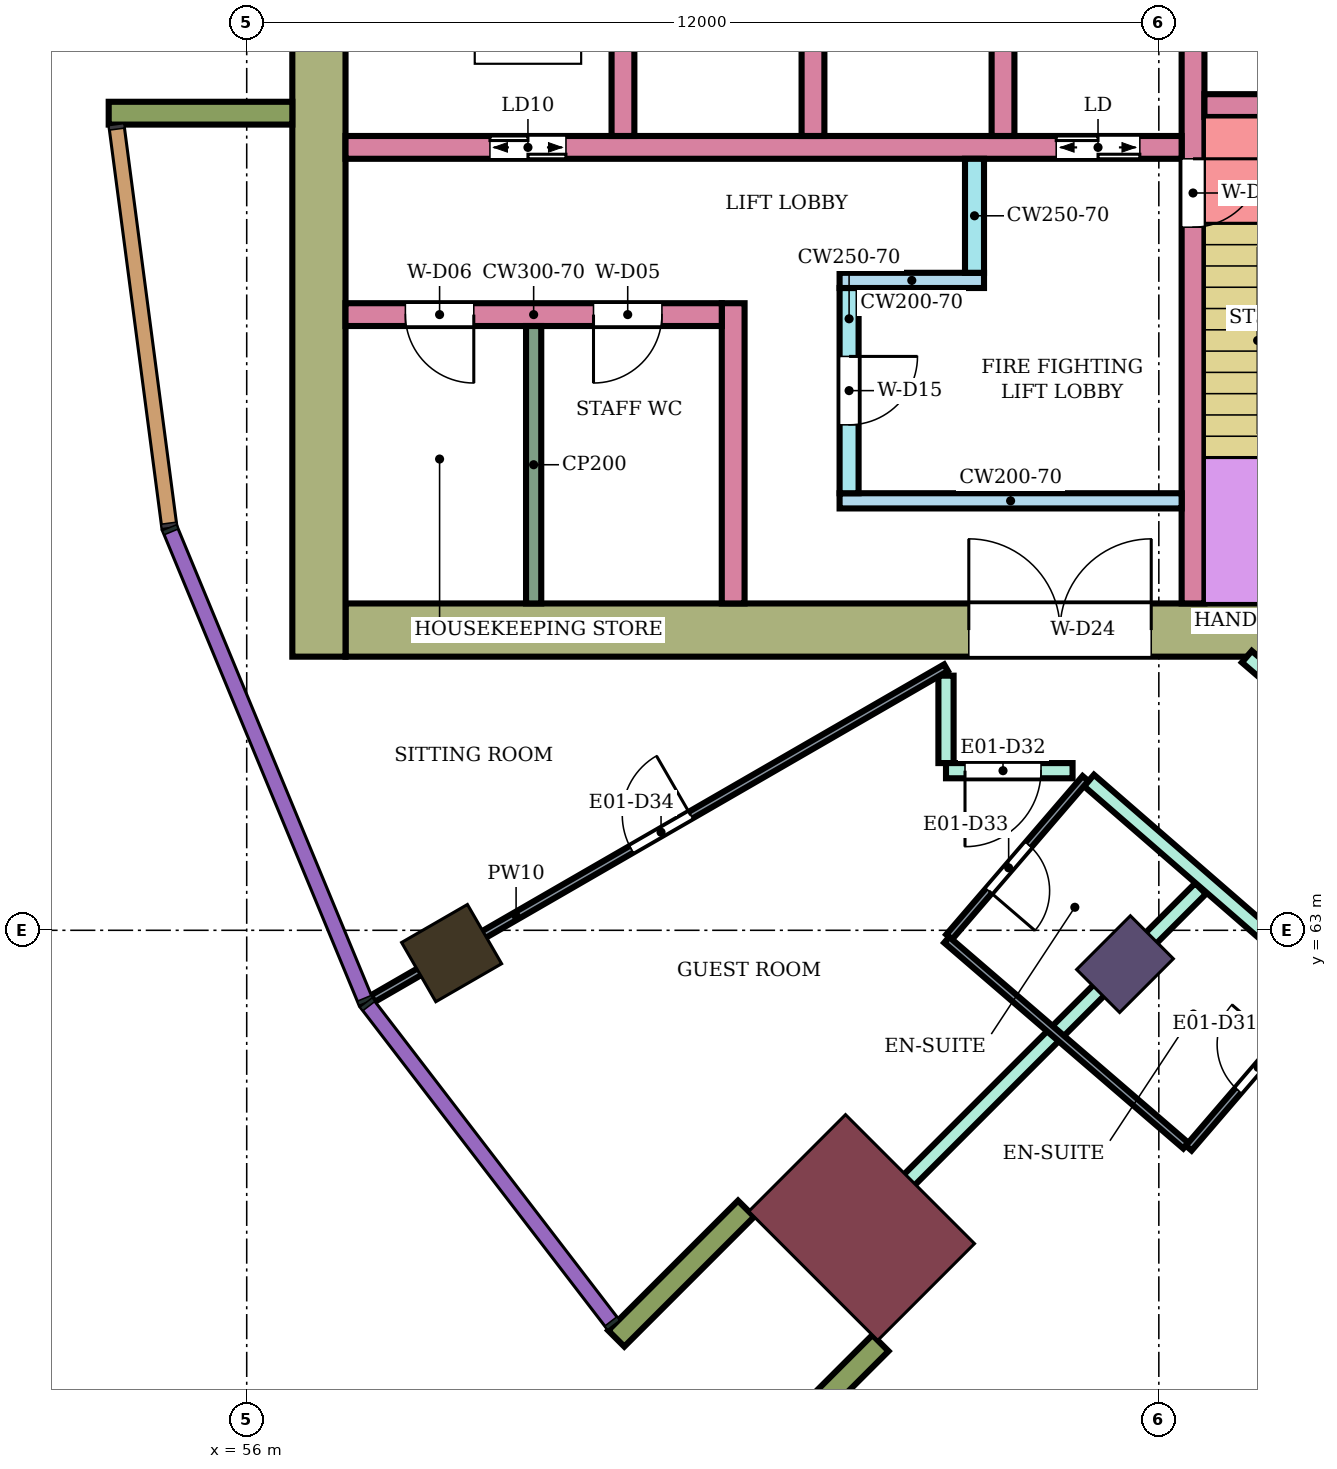
"""IFC4 building model, lengths in metres.
Left out: names, types, materials, properties, quantities, classifications, styles, units other than length and angle.
Written with IfcOpenShell. Run it as: python <this file> out.ifc"""

import sys

from ifc_helpers import new_model, si_unit, direction, frame, frame_2d, origin, origin_2d, place, context, subcontext, project, spatial, rectangle, extrude, element, fill, save


model = new_model("IFC4")
c1 = context("Model", 3, precision=1e-05, world=origin(), true_north=direction((0.0, 1.0)))
c2 = subcontext(c1, "Body", "Model", "MODEL_VIEW")
j1 = project(units=[si_unit("LENGTHUNIT", "METRE"), si_unit("PLANEANGLEUNIT", "RADIAN")], contexts=[c1])
p1 = place(None, origin())
s1 = spatial("IfcSite", under=j1, at=p1, CompositionType="ELEMENT")
p2 = place(p1, origin())
s2 = spatial("IfcBuilding", under=s1, at=p2, CompositionType="ELEMENT")
p3 = place(p2, frame((0.0, 0.0, 114.6)))
s3 = spatial("IfcBuildingStorey", under=s2, at=p3, CompositionType="ELEMENT", Elevation=114.6)
p4 = place(p3, frame((58.696, 62.7, 0.0), z_axis=(0.0, 0.0, 1.0), x_axis=(-0.866025403784, -0.5, 0.0)))
e1 = element("IfcColumn", 1, at=p4, inside=s3, PredefinedType="COLUMN", context=c2, shape_type="SweptSolid", body=[
    extrude(rectangle(XDim=1.0, YDim=0.9, at=origin_2d()), origin(), (0.0, 0.0, 1.0), 3.9),
])
p5 = place(p3, frame((67.555, 62.555, 0.0), z_axis=(0.0, 0.0, 1.0), x_axis=(-0.707106781187, -0.707106781187, 0.0)))
e2 = element("IfcColumn", 2, at=p5, inside=s3, PredefinedType="COLUMN", context=c2, shape_type="SweptSolid", body=[
    extrude(rectangle(XDim=1.0, YDim=0.8, at=origin_2d()), origin(), (0.0, 0.0, 1.0), 3.9),
])
p6 = place(p3, frame((64.09, 59.09, 0.0), z_axis=(0.0, 0.0, 1.0), x_axis=(-0.707106781187, -0.707106781187, 0.0)))
e3 = element("IfcColumn", 3, at=p6, inside=s3, PredefinedType="COLUMN", context=c2, shape_type="SweptSolid", body=[
    extrude(rectangle(XDim=1.8, YDim=2.4, at=origin_2d()), origin(), (0.0, 0.0, 1.0), 3.9),
])
p7 = place(p3, frame((72.1, 66.95, 0.0), z_axis=(0.0, 0.0, 1.0), x_axis=(-1.0, 0.0, 0.0)))
e4 = element("IfcWall", 4, at=p7, inside=s3, PredefinedType="SHEAR", context=c2, shape_type="SweptSolid", body=[
    extrude(rectangle(XDim=14.8, YDim=0.7, at=frame_2d((7.4, 0.0))), origin(), (0.0, 0.0, 1.0), 3.58),
])
p8 = place(p7, frame((4.2, 0.0, 0.0)))
e5 = element("IfcOpeningElement", 5, at=p8, cuts=e4, PredefinedType="OPENING", context=c2, shape_type="SweptSolid", body=[
    extrude(rectangle(XDim=2.4, YDim=2.4, at=frame_2d((1.2, 1.2))), frame((0.0, 0.36, 0.0), z_axis=(0.0, -1.0, 0.0), x_axis=(1.0, 0.0, 0.0)), (0.0, 0.0, 1.0), 0.72),
])
p9 = place(p3, frame((56.95, 83.4, 0.0), z_axis=(0.0, 0.0, 1.0), x_axis=(0.0, -1.0, 0.0)))
e6 = element("IfcWall", 6, at=p9, inside=s3, PredefinedType="SHEAR", context=c2, shape_type="SweptSolid", body=[
    extrude(rectangle(XDim=16.8, YDim=0.7, at=frame_2d((8.4, 0.0))), origin(), (0.0, 0.0, 1.0), 3.58),
])
p10 = place(p3, frame((68.45, 75.0, 0.0), z_axis=(0.0, 0.0, 1.0), x_axis=(0.0, -1.0, 0.0)))
e7 = element("IfcWall", 7, at=p10, inside=s3, PredefinedType="SHEAR", context=c2, shape_type="SweptSolid", body=[
    extrude(rectangle(XDim=7.7, YDim=0.3, at=frame_2d((3.85, 0.0))), origin(), (0.0, 0.0, 1.0), 3.58),
])
p11 = place(p10, frame((1.85, 0.0, 0.0)))
e8 = element("IfcOpeningElement", 8, at=p11, cuts=e7, PredefinedType="OPENING", context=c2, shape_type="SweptSolid", body=[
    extrude(rectangle(XDim=0.9, YDim=2.1, at=frame_2d((0.45, 1.05))), frame((0.0, 0.16, 0.0), z_axis=(0.0, -1.0, 0.0), x_axis=(1.0, 0.0, 0.0)), (0.0, 0.0, 1.0), 0.32),
])
p12 = place(p3, frame((71.65, 73.85, 0.0), z_axis=(0.0, 0.0, 1.0), x_axis=(-1.0, 0.0, 0.0)))
e9 = element("IfcWall", 9, at=p12, inside=s3, PredefinedType="SHEAR", context=c2, shape_type="SweptSolid", body=[
    extrude(rectangle(XDim=3.05, YDim=0.3, at=frame_2d((1.525, 0.0))), origin(), (0.0, 0.0, 1.0), 3.58),
])
p13 = place(p12, frame((1.1, 0.0, 0.0)))
e10 = element("IfcOpeningElement", 10, at=p13, cuts=e9, PredefinedType="OPENING", context=c2, shape_type="SweptSolid", body=[
    extrude(rectangle(XDim=0.7, YDim=2.0, at=frame_2d((0.35, 1.0))), frame((0.0, 0.16, 0.0), z_axis=(0.0, -1.0, 0.0), x_axis=(1.0, 0.0, 0.0)), (0.0, 0.0, 1.0), 0.32),
])
p14 = place(p3, frame((68.3, 73.3, 0.0), z_axis=(0.0, 0.0, 1.0), x_axis=(-1.0, 0.0, 0.0)))
e11 = element("IfcWall", 11, at=p14, inside=s3, PredefinedType="SHEAR", context=c2, shape_type="SweptSolid", body=[
    extrude(rectangle(XDim=11.0, YDim=0.3, at=frame_2d((5.5, 0.0))), origin(), (0.0, 0.0, 1.0), 3.58),
])
p15 = place(p14, frame((0.55, 0.0, 0.0)))
e12 = element("IfcOpeningElement", 12, at=p15, cuts=e11, PredefinedType="OPENING", context=c2, shape_type="SweptSolid", body=[
    extrude(rectangle(XDim=1.1, YDim=2.1, at=frame_2d((0.55, 1.05))), frame((0.0, 0.16, 0.0), z_axis=(0.0, -1.0, 0.0), x_axis=(1.0, 0.0, 0.0)), (0.0, 0.0, 1.0), 0.32),
])
p16 = place(p14, frame((8.1, 0.0, 0.0)))
e13 = element("IfcOpeningElement", 13, at=p16, cuts=e11, PredefinedType="OPENING", context=c2, shape_type="SweptSolid", body=[
    extrude(rectangle(XDim=1.0, YDim=2.1, at=frame_2d((0.5, 1.05))), frame((0.0, 0.16, 0.0), z_axis=(0.0, -1.0, 0.0), x_axis=(1.0, 0.0, 0.0)), (0.0, 0.0, 1.0), 0.32),
])
for number, where, z_axis, x_axis in (
    (14, (65.95, 76.0, 0.0), (0.0, 0.0, 1.0), (0.0, -1.0, 0.0)),
    (15, (63.45, 76.0, 0.0), (0.0, 0.0, 1.0), (0.0, -1.0, 0.0)),
    (16, (60.95, 76.0, 0.0), (0.0, 0.0, 1.0), (0.0, -1.0, 0.0)),
):
    element("IfcWall", number, at=place(p3, frame(where, z_axis=z_axis, x_axis=x_axis)), inside=s3, PredefinedType="SHEAR", context=c2, shape_type="SweptSolid", body=[
        extrude(rectangle(XDim=2.55, YDim=0.3, at=frame_2d((1.275, 0.0))), origin(), (0.0, 0.0, 1.0), 3.58),
    ])
p17 = place(p3, frame((68.3, 68.65, 0.0), z_axis=(0.0, 0.0, 1.0), x_axis=(-1.0, 0.0, 0.0)))
e17 = element("IfcWall", 17, at=p17, inside=s3, PredefinedType="SHEAR", context=c2, shape_type="SweptSolid", body=[
    extrude(rectangle(XDim=4.5, YDim=0.2, at=frame_2d((2.25, 0.0))), origin(), (0.0, 0.0, 1.0), 3.58),
])
p18 = place(p3, frame((63.925, 71.45, 0.0), z_axis=(0.0, 0.0, 1.0), x_axis=(0.0, -1.0, 0.0)))
e18 = element("IfcWall", 18, at=p18, inside=s3, PredefinedType="SHEAR", context=c2, shape_type="SweptSolid", body=[
    extrude(rectangle(XDim=2.7, YDim=0.25, at=frame_2d((1.35, 0.0))), origin(), (0.0, 0.0, 1.0), 3.58),
])
p19 = place(p18, frame((0.9, 0.0, 0.0)))
e19 = element("IfcOpeningElement", 19, at=p19, cuts=e18, PredefinedType="OPENING", context=c2, shape_type="SweptSolid", body=[
    extrude(rectangle(XDim=0.9, YDim=2.1, at=frame_2d((0.45, 1.05))), frame((0.0, 0.135, 0.0), z_axis=(0.0, -1.0, 0.0), x_axis=(1.0, 0.0, 0.0)), (0.0, 0.0, 1.0), 0.27),
])
p20 = place(p3, frame((65.7, 71.55, 0.0), z_axis=(0.0, 0.0, 1.0), x_axis=(-1.0, 0.0, 0.0)))
e20 = element("IfcWall", 20, at=p20, inside=s3, PredefinedType="SHEAR", context=c2, shape_type="SweptSolid", body=[
    extrude(rectangle(XDim=1.9, YDim=0.2, at=frame_2d((0.95, 0.0))), origin(), (0.0, 0.0, 1.0), 3.58),
])
p21 = place(p3, frame((65.575, 73.15, 0.0), z_axis=(0.0, 0.0, 1.0), x_axis=(0.0, -1.0, 0.0)))
e21 = element("IfcWall", 21, at=p21, inside=s3, PredefinedType="SHEAR", context=c2, shape_type="SweptSolid", body=[
    extrude(rectangle(XDim=1.5, YDim=0.25, at=frame_2d((0.75, 0.0))), origin(), (0.0, 0.0, 1.0), 3.58),
])
p22 = place(p3, frame((62.4, 71.25, 0.0), z_axis=(0.0, 0.0, 1.0), x_axis=(0.0, -1.0, 0.0)))
e22 = element("IfcWall", 22, at=p22, inside=s3, PredefinedType="SHEAR", context=c2, shape_type="SweptSolid", body=[
    extrude(rectangle(XDim=3.95, YDim=0.3, at=frame_2d((1.975, 0.0))), origin(), (0.0, 0.0, 1.0), 3.58),
])
p23 = place(p3, frame((62.25, 71.1, 0.0), z_axis=(0.0, 0.0, 1.0), x_axis=(-1.0, 0.0, 0.0)))
e23 = element("IfcWall", 23, at=p23, inside=s3, PredefinedType="SHEAR", context=c2, shape_type="SweptSolid", body=[
    extrude(rectangle(XDim=4.95, YDim=0.3, at=frame_2d((2.475, 0.0))), origin(), (0.0, 0.0, 1.0), 3.58),
])
p24 = place(p23, frame((0.788, 0.0, 0.0)))
e24 = element("IfcOpeningElement", 24, at=p24, cuts=e23, PredefinedType="OPENING", context=c2, shape_type="SweptSolid", body=[
    extrude(rectangle(XDim=0.9, YDim=2.1, at=frame_2d((0.45, 1.05))), frame((0.0, 0.16, 0.0), z_axis=(0.0, -1.0, 0.0), x_axis=(1.0, 0.0, 0.0)), (0.0, 0.0, 1.0), 0.32),
])
p25 = place(p23, frame((3.262, 0.0, 0.0)))
e25 = element("IfcOpeningElement", 25, at=p25, cuts=e23, PredefinedType="OPENING", context=c2, shape_type="SweptSolid", body=[
    extrude(rectangle(XDim=0.9, YDim=2.1, at=frame_2d((0.45, 1.05))), frame((0.0, 0.16, 0.0), z_axis=(0.0, -1.0, 0.0), x_axis=(1.0, 0.0, 0.0)), (0.0, 0.0, 1.0), 0.32),
])
for number, where, z_axis, x_axis in (
    (26, (56.6, 73.75, 0.0), (0.0, 0.0, 1.0), (-1.0, 0.0, 0.0)),
    (27, (62.57, 59.338, 0.0), (0.0, 0.0, 1.0), (-0.707, -0.707, 0.0)),
    (28, (64.338, 57.57, 0.0), (0.0, 0.0, 1.0), (-0.707, -0.707, 0.0)),
):
    element("IfcWall", number, at=place(p3, frame(where, z_axis=z_axis, x_axis=x_axis)), inside=s3, PredefinedType="NOTDEFINED", context=c2, shape_type="SweptSolid", body=[
        extrude(rectangle(XDim=2.416, YDim=0.3, at=frame_2d((1.208, 0.0))), origin(), (0.0, 0.0, 1.0), 3.9),
    ])
p26 = place(p3, frame((63.596, 58.596, 0.0), z_axis=(0.0, 0.0, 1.0), x_axis=(0.707106781187, 0.707106781187, 0.0)))
e29 = element("IfcWall", 29, at=p26, inside=s3, PredefinedType="PARTITIONING", context=c2, shape_type="SweptSolid", body=[
    extrude(rectangle(XDim=7.005, YDim=0.2, at=frame_2d((3.503, 0.0))), origin(), (0.0, 0.0, 1.0), 3.45),
])
p27 = place(p3, frame((65.2, 65.2, 0.0), z_axis=(0.0, 0.0, 1.0), x_axis=(0.0, 1.0, 0.0)))
e30 = element("IfcWall", 30, at=p27, inside=s3, PredefinedType="PARTITIONING", context=c2, shape_type="SweptSolid", body=[
    extrude(rectangle(XDim=1.15, YDim=0.2, at=frame_2d((0.575, 0.0))), origin(), (0.0, 0.0, 1.0), 3.45),
])
p28 = place(p3, frame((65.2, 65.1, 0.0), z_axis=(0.0, 0.0, 1.0), x_axis=(1.0, 0.0, 0.0)))
e31 = element("IfcWall", 31, at=p28, inside=s3, PredefinedType="PARTITIONING", context=c2, shape_type="SweptSolid", body=[
    extrude(rectangle(XDim=1.665, YDim=0.2, at=frame_2d((0.833, 0.0))), origin(), (0.0, 0.0, 1.0), 3.45),
])
p29 = place(p28, frame((0.25, 0.0, 0.0)))
e32 = element("IfcOpeningElement", 32, at=p29, cuts=e31, PredefinedType="OPENING", context=c2, shape_type="SweptSolid", body=[
    extrude(rectangle(XDim=1.0, YDim=2.1, at=frame_2d((0.5, 1.05))), frame((0.0, 0.11, 0.0), z_axis=(0.0, -1.0, 0.0), x_axis=(1.0, 0.0, 0.0)), (0.0, 0.0, 1.0), 0.22),
])
p30 = place(p3, frame((67.081, 64.971, 0.0), z_axis=(0.0, 0.0, 1.0), x_axis=(0.755031061605, -0.65568902386, 0.0)))
e33 = element("IfcWall", 33, at=p30, inside=s3, PredefinedType="PARTITIONING", context=c2, shape_type="SweptSolid", body=[
    extrude(rectangle(XDim=6.186, YDim=0.2, at=frame_2d((3.093, 0.0))), origin(), (0.0, 0.0, 1.0), 3.45),
])
p31 = place(p30, frame((4.755, 0.0, 0.0)))
e34 = element("IfcOpeningElement", 34, at=p31, cuts=e33, PredefinedType="OPENING", context=c2, shape_type="SweptSolid", body=[
    extrude(rectangle(XDim=1.0, YDim=2.1, at=frame_2d((0.5, 1.05))), frame((0.0, 0.11, 0.0), z_axis=(0.0, -1.0, 0.0), x_axis=(1.0, 0.0, 0.0)), (0.0, 0.0, 1.0), 0.22),
])
p32 = place(p3, frame((67.094, 52.663, 0.0), z_axis=(0.0, 0.0, 1.0), x_axis=(0.500228134253, 0.865893650342, 0.0)))
e35 = element("IfcWall", 35, at=p32, inside=s3, PredefinedType="PARTITIONING", context=c2, shape_type="SweptSolid", body=[
    extrude(rectangle(XDim=9.375, YDim=0.2, at=frame_2d((4.687, 0.0))), origin(), (0.0, 0.0, 1.0), 3.45),
])
p33 = place(p3, frame((69.158, 66.6, 0.0), z_axis=(0.0, 0.0, 1.0), x_axis=(0.758063092745, -0.652181222835, 0.0)))
e36 = element("IfcWall", 36, at=p33, inside=s3, PredefinedType="PARTITIONING", context=c2, shape_type="SweptSolid", body=[
    extrude(rectangle(XDim=5.16, YDim=0.2, at=frame_2d((2.58, 0.0))), origin(), (0.0, 0.0, 1.0), 3.45),
])
p34 = place(p33, frame((2.165, 0.0, 0.0)))
e37 = element("IfcOpeningElement", 37, at=p34, cuts=e36, PredefinedType="OPENING", context=c2, shape_type="SweptSolid", body=[
    extrude(rectangle(XDim=0.9, YDim=2.1, at=frame_2d((0.45, 1.05))), frame((0.0, 0.11, 0.0), z_axis=(0.0, -1.0, 0.0), x_axis=(1.0, 0.0, 0.0)), (0.0, 0.0, 1.0), 0.22),
])
p35 = place(p3, frame((57.659, 62.101, 0.0), z_axis=(0.0, 0.0, 1.0), x_axis=(0.86602264145, 0.500004784474, 0.0)))
e38 = element("IfcWall", 38, at=p35, inside=s3, PredefinedType="PARTITIONING", context=c2, shape_type="SweptSolid", body=[
    extrude(rectangle(XDim=8.708, YDim=0.1, at=frame_2d((4.354, 0.0))), origin(), (0.0, 0.0, 1.0), 3.45),
])
p36 = place(p35, frame((3.929, 0.0, 0.0)))
e39 = element("IfcOpeningElement", 39, at=p36, cuts=e38, PredefinedType="OPENING", context=c2, shape_type="SweptSolid", body=[
    extrude(rectangle(XDim=0.9, YDim=2.1, at=frame_2d((0.45, 1.05))), frame((0.0, 0.06, 0.0), z_axis=(0.0, -1.0, 0.0), x_axis=(1.0, 0.0, 0.0)), (0.0, 0.0, 1.0), 0.12),
])
p37 = place(p3, frame((65.242, 62.912, 0.0), z_axis=(0.0, 0.0, 1.0), x_axis=(0.652069888227, 0.758158862553, 0.0)))
e40 = element("IfcWall", 40, at=p37, inside=s3, PredefinedType="PARTITIONING", context=c2, shape_type="SweptSolid", body=[
    extrude(rectangle(XDim=2.75, YDim=0.1, at=frame_2d((1.375, 0.0))), origin(), (0.0, 0.0, 1.0), 3.45),
])
p38 = place(p37, frame((0.8, 0.0, 0.0)))
e41 = element("IfcOpeningElement", 41, at=p38, cuts=e40, PredefinedType="OPENING", context=c2, shape_type="SweptSolid", body=[
    extrude(rectangle(XDim=0.8, YDim=2.1, at=frame_2d((0.4, 1.05))), frame((0.0, 0.06, 0.0), z_axis=(0.0, -1.0, 0.0), x_axis=(1.0, 0.0, 0.0)), (0.0, 0.0, 1.0), 0.12),
])
p39 = place(p3, frame((65.209, 62.875, 0.0), z_axis=(0.0, 0.0, 1.0), x_axis=(0.757930378138, -0.652335451969, 0.0)))
e42 = element("IfcWall", 42, at=p39, inside=s3, PredefinedType="PARTITIONING", context=c2, shape_type="SweptSolid", body=[
    extrude(rectangle(XDim=4.15, YDim=0.1, at=frame_2d((2.075, 0.0))), origin(), (0.0, 0.0, 1.0), 3.45),
])
p40 = place(p3, frame((68.393, 60.135, 0.0), z_axis=(0.0, 0.0, 1.0), x_axis=(0.652061182569, 0.758166349944, 0.0)))
e43 = element("IfcWall", 43, at=p40, inside=s3, PredefinedType="PARTITIONING", context=c2, shape_type="SweptSolid", body=[
    extrude(rectangle(XDim=2.69, YDim=0.1, at=frame_2d((1.345, 0.0))), origin(), (0.0, 0.0, 1.0), 3.45),
])
p41 = place(p40, frame((1.0, 0.0, 0.0)))
e44 = element("IfcOpeningElement", 44, at=p41, cuts=e43, PredefinedType="OPENING", context=c2, shape_type="SweptSolid", body=[
    extrude(rectangle(XDim=0.8, YDim=2.1, at=frame_2d((0.4, 1.05))), frame((0.0, 0.06, 0.0), z_axis=(0.0, -1.0, 0.0), x_axis=(1.0, 0.0, 0.0)), (0.0, 0.0, 1.0), 0.12),
])
p42 = place(p3, frame((59.775, 70.95, 0.0), z_axis=(0.0, 0.0, 1.0), x_axis=(0.0, -1.0, 0.0)))
e45 = element("IfcWall", 45, at=p42, inside=s3, PredefinedType="PARTITIONING", context=c2, shape_type="SweptSolid", body=[
    extrude(rectangle(XDim=3.65, YDim=0.2, at=frame_2d((1.825, 0.0))), origin(), (0.0, 0.0, 1.0), 3.58),
])
p43 = place(p41, origin())
e46 = element("IfcDoor", 46, at=p43, inside=s3, OperationType="SINGLE_SWING_RIGHT", PredefinedType="DOOR", context=c2, shape_type="SweptSolid", body=[
    extrude(rectangle(XDim=0.8, YDim=2.1, at=frame_2d((0.4, 1.05))), frame((0.0, 0.025, 0.0), z_axis=(0.0, -1.0, 0.0), x_axis=(1.0, 0.0, 0.0)), (0.0, 0.0, 1.0), 0.05),
])
fill(e44, e46)
p44 = place(p29, frame((1.0, 0.0, 0.0), z_axis=(0.0, 0.0, 1.0), x_axis=(-1.0, 0.0, 0.0)))
e47 = element("IfcDoor", 47, at=p44, inside=s3, OperationType="SINGLE_SWING_RIGHT", PredefinedType="DOOR", context=c2, shape_type="SweptSolid", body=[
    extrude(rectangle(XDim=1.0, YDim=2.1, at=frame_2d((0.5, 1.05))), frame((0.0, 0.025, 0.0), z_axis=(0.0, -1.0, 0.0), x_axis=(1.0, 0.0, 0.0)), (0.0, 0.0, 1.0), 0.05),
])
fill(e32, e47)
p45 = place(p38, frame((0.8, 0.0, 0.0), z_axis=(0.0, 0.0, 1.0), x_axis=(-1.0, 0.0, 0.0)))
e48 = element("IfcDoor", 48, at=p45, inside=s3, OperationType="SINGLE_SWING_RIGHT", PredefinedType="DOOR", context=c2, shape_type="SweptSolid", body=[
    extrude(rectangle(XDim=0.8, YDim=2.1, at=frame_2d((0.4, 1.05))), frame((0.0, 0.025, 0.0), z_axis=(0.0, -1.0, 0.0), x_axis=(1.0, 0.0, 0.0)), (0.0, 0.0, 1.0), 0.05),
])
fill(e41, e48)
p46 = place(p36, origin())
e49 = element("IfcDoor", 49, at=p46, inside=s3, OperationType="SINGLE_SWING_RIGHT", PredefinedType="DOOR", context=c2, shape_type="SweptSolid", body=[
    extrude(rectangle(XDim=0.9, YDim=2.1, at=frame_2d((0.45, 1.05))), frame((0.0, 0.025, 0.0), z_axis=(0.0, -1.0, 0.0), x_axis=(1.0, 0.0, 0.0)), (0.0, 0.0, 1.0), 0.05),
])
fill(e39, e49)
p47 = place(p11, origin())
e50 = element("IfcDoor", 50, at=p47, inside=s3, OperationType="SINGLE_SWING_LEFT", PredefinedType="DOOR", context=c2, shape_type="SweptSolid", body=[
    extrude(rectangle(XDim=0.9, YDim=2.1, at=frame_2d((0.45, 1.05))), frame((0.0, 0.025, 0.0), z_axis=(0.0, -1.0, 0.0), x_axis=(1.0, 0.0, 0.0)), (0.0, 0.0, 1.0), 0.05),
])
fill(e8, e50)
p48 = place(p15, origin())
e51 = element("IfcDoor", 51, at=p48, inside=s3, OperationType="DOUBLE_DOOR_SLIDING", PredefinedType="DOOR", context=c2, shape_type="SweptSolid", body=[
    extrude(rectangle(XDim=1.1, YDim=2.1, at=frame_2d((0.55, 1.05))), frame((0.0, 0.025, 0.0), z_axis=(0.0, -1.0, 0.0), x_axis=(1.0, 0.0, 0.0)), (0.0, 0.0, 1.0), 0.05),
])
fill(e12, e51)
p49 = place(p16, origin())
e52 = element("IfcDoor", 52, at=p49, inside=s3, OperationType="DOUBLE_DOOR_SLIDING", PredefinedType="DOOR", context=c2, shape_type="SweptSolid", body=[
    extrude(rectangle(XDim=1.0, YDim=2.1, at=frame_2d((0.5, 1.05))), frame((0.0, 0.025, 0.0), z_axis=(0.0, -1.0, 0.0), x_axis=(1.0, 0.0, 0.0)), (0.0, 0.0, 1.0), 0.05),
])
fill(e13, e52)
p50 = place(p19, origin())
e53 = element("IfcDoor", 53, at=p50, inside=s3, OperationType="SINGLE_SWING_LEFT", PredefinedType="DOOR", context=c2, shape_type="SweptSolid", body=[
    extrude(rectangle(XDim=0.9, YDim=2.1, at=frame_2d((0.45, 1.05))), frame((0.0, 0.025, 0.0), z_axis=(0.0, -1.0, 0.0), x_axis=(1.0, 0.0, 0.0)), (0.0, 0.0, 1.0), 0.05),
])
fill(e19, e53)
p51 = place(p24, origin())
e54 = element("IfcDoor", 54, at=p51, inside=s3, OperationType="SINGLE_SWING_RIGHT", PredefinedType="DOOR", context=c2, shape_type="SweptSolid", body=[
    extrude(rectangle(XDim=0.9, YDim=2.1, at=frame_2d((0.45, 1.05))), frame((0.0, 0.025, 0.0), z_axis=(0.0, -1.0, 0.0), x_axis=(1.0, 0.0, 0.0)), (0.0, 0.0, 1.0), 0.05),
])
fill(e24, e54)
p52 = place(p25, origin())
e55 = element("IfcDoor", 55, at=p52, inside=s3, OperationType="SINGLE_SWING_LEFT", PredefinedType="DOOR", context=c2, shape_type="SweptSolid", body=[
    extrude(rectangle(XDim=0.9, YDim=2.1, at=frame_2d((0.45, 1.05))), frame((0.0, 0.025, 0.0), z_axis=(0.0, -1.0, 0.0), x_axis=(1.0, 0.0, 0.0)), (0.0, 0.0, 1.0), 0.05),
])
fill(e25, e55)
p53 = place(p8, frame((2.4, 0.0, 0.0), z_axis=(0.0, 0.0, 1.0), x_axis=(-1.0, 0.0, 0.0)))
e56 = element("IfcDoor", 56, at=p53, inside=s3, OperationType="DOUBLE_DOOR_SINGLE_SWING", PredefinedType="DOOR", context=c2, shape_type="SweptSolid", body=[
    extrude(rectangle(XDim=2.4, YDim=2.4, at=frame_2d((1.2, 1.2))), frame((0.0, 0.025, 0.0), z_axis=(0.0, -1.0, 0.0), x_axis=(1.0, 0.0, 0.0)), (0.0, 0.0, 1.0), 0.05),
])
fill(e5, e56)
save(model, sys.argv[1])
